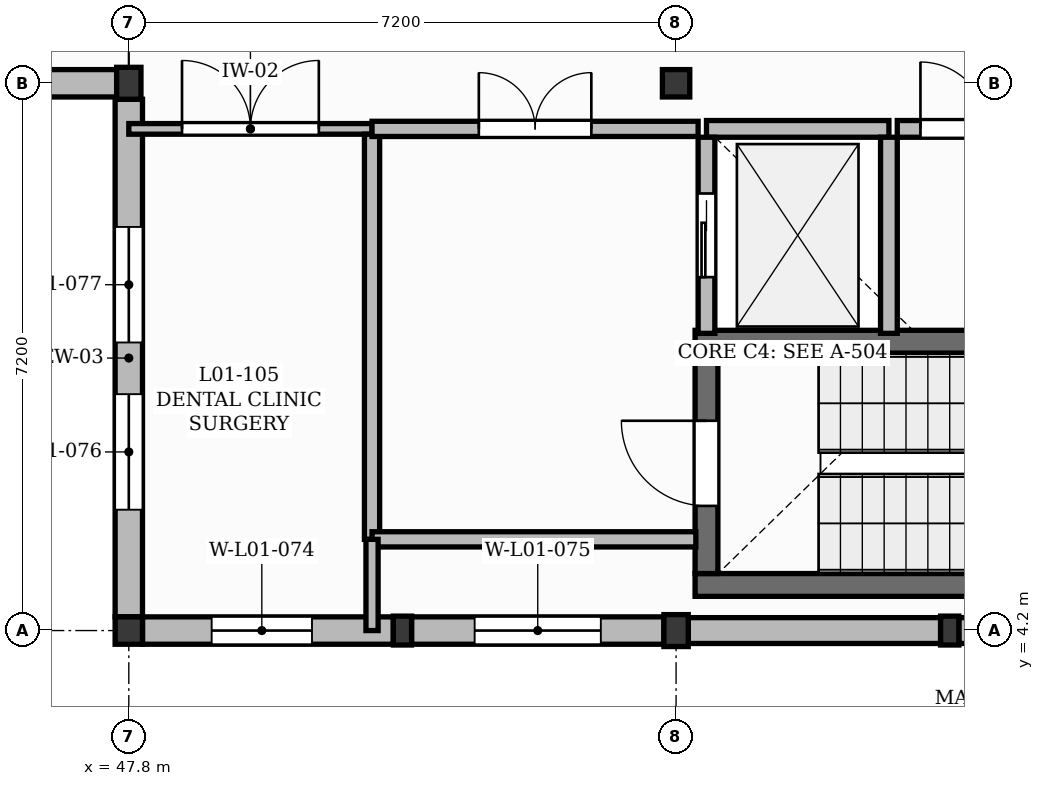
"""IFC4 building model, lengths in metres.
Left out: names, types, materials, properties, quantities, classifications, styles, units other than length and angle.
Written with IfcOpenShell. Run it as: python <this file> out.ifc"""

import sys

from ifc_helpers import new_model, si_unit, direction, frame, frame_2d, origin, origin_2d, place, context, subcontext, project, spatial, rectangle, extrude, element, fill, save


model = new_model("IFC4")
c1 = context("Model", 3, precision=1e-05, world=origin(), true_north=direction((0.0, 1.0)))
c2 = subcontext(c1, "Body", "Model", "MODEL_VIEW")
j1 = project(units=[si_unit("LENGTHUNIT", "METRE"), si_unit("PLANEANGLEUNIT", "RADIAN")], contexts=[c1])
p1 = place(None, origin())
s1 = spatial("IfcSite", under=j1, at=p1, CompositionType="ELEMENT")
p2 = place(p1, origin())
s2 = spatial("IfcBuilding", under=s1, at=p2, CompositionType="ELEMENT")
p3 = place(p2, frame((0.0, 0.0, 4.5)))
s3 = spatial("IfcBuildingStorey", under=s2, at=p3, CompositionType="ELEMENT", Elevation=4.5)
p4 = place(p3, frame((47.8, 4.2, 0.0), z_axis=(0.0, 0.0, 1.0), x_axis=(1.0, 0.0, 0.0)))
e1 = element("IfcColumn", 1, at=p4, inside=s3, PredefinedType="COLUMN", context=c2, shape_type="SweptSolid", body=[
    extrude(rectangle(XDim=0.36, YDim=0.36, at=origin_2d()), origin(), (0.0, 0.0, 1.0), 4.26),
])
for number, where, z_axis, x_axis in (
    (2, (47.8, 11.4, 0.0), (0.0, 0.0, 1.0), (1.0, 0.0, 0.0)),
    (3, (55.0, 4.2, 0.0), (0.0, 0.0, 1.0), (1.0, 0.0, 0.0)),
):
    element("IfcColumn", number, at=place(p3, frame(where, z_axis=z_axis, x_axis=x_axis)), inside=s3, PredefinedType="COLUMN", context=c2, shape_type="SweptSolid", body=[
        extrude(rectangle(XDim=0.32, YDim=0.42, at=origin_2d()), origin(), (0.0, 0.0, 1.0), 4.26),
    ])
p5 = place(p3, frame((55.0, 11.4, 0.0), z_axis=(0.0, 0.0, 1.0), x_axis=(1.0, 0.0, 0.0)))
e4 = element("IfcColumn", 4, at=p5, inside=s3, PredefinedType="COLUMN", context=c2, shape_type="SweptSolid", body=[
    extrude(rectangle(XDim=0.36, YDim=0.36, at=origin_2d()), origin(), (0.0, 0.0, 1.0), 4.26),
])
for number, where, z_axis, x_axis in (
    (5, (51.4, 4.2, 0.0), (0.0, 0.0, 1.0), (1.0, 0.0, 0.0)),
    (6, (58.6, 4.2, 0.0), (0.0, 0.0, 1.0), (1.0, 0.0, 0.0)),
):
    element("IfcColumn", number, at=place(p3, frame(where, z_axis=z_axis, x_axis=x_axis)), inside=s3, PredefinedType="PILASTER", context=c2, shape_type="SweptSolid", body=[
        extrude(rectangle(XDim=0.24, YDim=0.38, at=origin_2d()), origin(), (0.0, 0.0, 1.0), 4.26),
    ])
p6 = place(p3, frame((40.78, 11.4, 0.0), z_axis=(0.0, 0.0, 1.0), x_axis=(1.0, 0.0, 0.0)))
e7 = element("IfcWall", 7, at=p6, inside=s3, PredefinedType="SOLIDWALL", context=c2, shape_type="SweptSolid", body=[
    extrude(rectangle(XDim=6.86, YDim=0.36, at=frame_2d((3.43, 0.0))), origin(), (0.0, 0.0, 1.0), 3.8),
])
p7 = place(p6, frame((1.33, 0.0, 1.0)))
e8 = element("IfcOpeningElement", 8, at=p7, cuts=e7, PredefinedType="OPENING", context=c2, shape_type="SweptSolid", body=[
    extrude(rectangle(XDim=1.76, YDim=1.95, at=frame_2d((0.88, 0.975))), frame((0.0, 0.19, 0.0), z_axis=(0.0, -1.0, 0.0), x_axis=(1.0, 0.0, 0.0)), (0.0, 0.0, 1.0), 0.38),
])
p8 = place(p6, frame((3.77, 0.0, 1.0)))
e9 = element("IfcOpeningElement", 9, at=p8, cuts=e7, PredefinedType="OPENING", context=c2, shape_type="SweptSolid", body=[
    extrude(rectangle(XDim=1.76, YDim=1.95, at=frame_2d((0.88, 0.975))), frame((0.0, 0.19, 0.0), z_axis=(0.0, -1.0, 0.0), x_axis=(1.0, 0.0, 0.0)), (0.0, 0.0, 1.0), 0.38),
])
p9 = place(p3, frame((47.98, 4.2, 0.0), z_axis=(0.0, 0.0, 1.0), x_axis=(1.0, 0.0, 0.0)))
e10 = element("IfcWall", 10, at=p9, inside=s3, PredefinedType="SOLIDWALL", context=c2, shape_type="SweptSolid", body=[
    extrude(rectangle(XDim=3.3, YDim=0.36, at=frame_2d((1.65, 0.0))), origin(), (0.0, 0.0, 1.0), 3.8),
])
p10 = place(p9, frame((0.91, 0.0, 1.5)))
e11 = element("IfcOpeningElement", 11, at=p10, cuts=e10, PredefinedType="OPENING", context=c2, shape_type="SweptSolid", body=[
    extrude(rectangle(XDim=1.32, YDim=1.25, at=frame_2d((0.66, 0.625))), frame((0.0, 0.19, 0.0), z_axis=(0.0, -1.0, 0.0), x_axis=(1.0, 0.0, 0.0)), (0.0, 0.0, 1.0), 0.38),
])
p11 = place(p3, frame((51.52, 4.2, 0.0), z_axis=(0.0, 0.0, 1.0), x_axis=(1.0, 0.0, 0.0)))
e12 = element("IfcWall", 12, at=p11, inside=s3, PredefinedType="SOLIDWALL", context=c2, shape_type="SweptSolid", body=[
    extrude(rectangle(XDim=3.32, YDim=0.36, at=frame_2d((1.66, 0.0))), origin(), (0.0, 0.0, 1.0), 3.8),
])
p12 = place(p11, frame((0.83, 0.0, 1.0)))
e13 = element("IfcOpeningElement", 13, at=p12, cuts=e12, PredefinedType="OPENING", context=c2, shape_type="SweptSolid", body=[
    extrude(rectangle(XDim=1.66, YDim=1.8, at=frame_2d((0.83, 0.9))), frame((0.0, 0.19, 0.0), z_axis=(0.0, -1.0, 0.0), x_axis=(1.0, 0.0, 0.0)), (0.0, 0.0, 1.0), 0.38),
])
p13 = place(p3, frame((47.8, 4.38, 0.0), z_axis=(0.0, 0.0, 1.0), x_axis=(0.0, 1.0, 0.0)))
e14 = element("IfcWall", 14, at=p13, inside=s3, PredefinedType="SOLIDWALL", context=c2, shape_type="SweptSolid", body=[
    extrude(rectangle(XDim=6.81, YDim=0.36, at=frame_2d((3.405, 0.0))), origin(), (0.0, 0.0, 1.0), 3.8),
])
p14 = place(p13, frame((1.41, 0.0, 1.0)))
e15 = element("IfcOpeningElement", 15, at=p14, cuts=e14, PredefinedType="OPENING", context=c2, shape_type="SweptSolid", body=[
    extrude(rectangle(XDim=1.52, YDim=1.8, at=frame_2d((0.76, 0.9))), frame((0.0, 0.19, 0.0), z_axis=(0.0, -1.0, 0.0), x_axis=(1.0, 0.0, 0.0)), (0.0, 0.0, 1.0), 0.38),
])
p15 = place(p13, frame((3.61, 0.0, 1.0)))
e16 = element("IfcOpeningElement", 16, at=p15, cuts=e14, PredefinedType="OPENING", context=c2, shape_type="SweptSolid", body=[
    extrude(rectangle(XDim=1.52, YDim=1.8, at=frame_2d((0.76, 0.9))), frame((0.0, 0.19, 0.0), z_axis=(0.0, -1.0, 0.0), x_axis=(1.0, 0.0, 0.0)), (0.0, 0.0, 1.0), 0.38),
])
p16 = place(p3, frame((55.16, 4.2, 0.0), z_axis=(0.0, 0.0, 1.0), x_axis=(1.0, 0.0, 0.0)))
e17 = element("IfcWall", 17, at=p16, inside=s3, PredefinedType="SOLIDWALL", context=c2, shape_type="SweptSolid", body=[
    extrude(rectangle(XDim=3.32, YDim=0.34, at=frame_2d((1.66, 0.0))), origin(), (0.0, 0.0, 1.0), 3.8),
])
p17 = place(p3, frame((58.72, 4.2, 0.0), z_axis=(0.0, 0.0, 1.0), x_axis=(1.0, 0.0, 0.0)))
e18 = element("IfcWall", 18, at=p17, inside=s3, PredefinedType="SOLIDWALL", context=c2, shape_type="SweptSolid", body=[
    extrude(rectangle(XDim=3.3, YDim=0.34, at=frame_2d((1.65, 0.0))), origin(), (0.0, 0.0, 1.0), 3.8),
])
for number, where, z_axis, x_axis in (
    (19, (55.25, 4.8, 0.0), (0.0, 0.0, 1.0), (1.0, 0.0, 0.0)),
    (20, (55.25, 8.0, 0.0), (0.0, 0.0, 1.0), (1.0, 0.0, 0.0)),
):
    element("IfcWall", number, at=place(p3, frame(where, z_axis=z_axis, x_axis=x_axis)), inside=s3, PredefinedType="SHEAR", context=c2, shape_type="SweptSolid", body=[
        extrude(rectangle(XDim=6.7, YDim=0.3, at=frame_2d((3.35, 0.0))), origin(), (0.0, 0.0, 1.0), 4.25),
    ])
p18 = place(p3, frame((55.4, 4.95, 0.0), z_axis=(0.0, 0.0, 1.0), x_axis=(0.0, 1.0, 0.0)))
e21 = element("IfcWall", 21, at=p18, inside=s3, PredefinedType="SHEAR", context=c2, shape_type="SweptSolid", body=[
    extrude(rectangle(XDim=2.9, YDim=0.3, at=frame_2d((1.45, 0.0))), origin(), (0.0, 0.0, 1.0), 4.25),
])
p19 = place(p18, frame((0.89, 0.0, 0.0)))
e22 = element("IfcOpeningElement", 22, at=p19, cuts=e21, PredefinedType="OPENING", context=c2, shape_type="SweptSolid", body=[
    extrude(rectangle(XDim=1.12, YDim=2.1, at=frame_2d((0.56, 1.05))), frame((0.0, 0.16, 0.0), z_axis=(0.0, -1.0, 0.0), x_axis=(1.0, 0.0, 0.0)), (0.0, 0.0, 1.0), 0.32),
])
p20 = place(p3, frame((55.4, 10.8, 0.0), z_axis=(0.0, 0.0, 1.0), x_axis=(1.0, 0.0, 0.0)))
e23 = element("IfcWall", 23, at=p20, inside=s3, PredefinedType="SOLIDWALL", context=c2, shape_type="SweptSolid", body=[
    extrude(rectangle(XDim=2.4, YDim=0.22, at=frame_2d((1.2, 0.0))), origin(), (0.0, 0.0, 1.0), 4.25),
])
p21 = place(p3, frame((55.4, 8.11, 0.0), z_axis=(0.0, 0.0, 1.0), x_axis=(0.0, 1.0, 0.0)))
e24 = element("IfcWall", 24, at=p21, inside=s3, PredefinedType="SOLIDWALL", context=c2, shape_type="SweptSolid", body=[
    extrude(rectangle(XDim=2.58, YDim=0.22, at=frame_2d((1.29, 0.0))), origin(), (0.0, 0.0, 1.0), 4.25),
])
p22 = place(p21, frame((0.74, 0.0, 0.0)))
e25 = element("IfcOpeningElement", 25, at=p22, cuts=e24, PredefinedType="OPENING", context=c2, shape_type="SweptSolid", body=[
    extrude(rectangle(XDim=1.1, YDim=2.15, at=frame_2d((0.55, 1.075))), frame((0.0, 0.12, 0.0), z_axis=(0.0, -1.0, 0.0), x_axis=(1.0, 0.0, 0.0)), (0.0, 0.0, 1.0), 0.24),
])
p23 = place(p3, frame((57.8, 8.11, 0.0), z_axis=(0.0, 0.0, 1.0), x_axis=(0.0, 1.0, 0.0)))
e26 = element("IfcWall", 26, at=p23, inside=s3, PredefinedType="SOLIDWALL", context=c2, shape_type="SweptSolid", body=[
    extrude(rectangle(XDim=2.58, YDim=0.22, at=frame_2d((1.29, 0.0))), origin(), (0.0, 0.0, 1.0), 4.25),
])
p24 = place(p3, frame((47.8, 10.8, 0.0), z_axis=(0.0, 0.0, 1.0), x_axis=(1.0, 0.0, 0.0)))
e27 = element("IfcWall", 27, at=p24, inside=s3, PredefinedType="PARTITIONING", context=c2, shape_type="SweptSolid", body=[
    extrude(rectangle(XDim=3.2, YDim=0.14, at=frame_2d((1.6, 0.0))), origin(), (0.0, 0.0, 1.0), 4.18),
])
p25 = place(p24, frame((0.7, 0.0, 0.0)))
e28 = element("IfcOpeningElement", 28, at=p25, cuts=e27, PredefinedType="OPENING", context=c2, shape_type="SweptSolid", body=[
    extrude(rectangle(XDim=1.8, YDim=2.3, at=frame_2d((0.9, 1.15))), frame((0.0, 0.08, 0.0), z_axis=(0.0, -1.0, 0.0), x_axis=(1.0, 0.0, 0.0)), (0.0, 0.0, 1.0), 0.16),
])
p26 = place(p3, frame((51.0, 5.4, 0.0), z_axis=(0.0, 0.0, 1.0), x_axis=(0.0, 1.0, 0.0)))
e29 = element("IfcWall", 29, at=p26, inside=s3, PredefinedType="PARTITIONING", context=c2, shape_type="SweptSolid", body=[
    extrude(rectangle(XDim=5.33, YDim=0.2, at=frame_2d((2.665, 0.0))), origin(), (0.0, 0.0, 1.0), 4.18),
])
p27 = place(p3, frame((51.0, 10.8, 0.0), z_axis=(0.0, 0.0, 1.0), x_axis=(1.0, 0.0, 0.0)))
e30 = element("IfcWall", 30, at=p27, inside=s3, PredefinedType="PARTITIONING", context=c2, shape_type="SweptSolid", body=[
    extrude(rectangle(XDim=4.29, YDim=0.2, at=frame_2d((2.145, 0.0))), origin(), (0.0, 0.0, 1.0), 4.18),
])
p28 = place(p27, frame((1.405, 0.0, 0.0)))
e31 = element("IfcOpeningElement", 31, at=p28, cuts=e30, PredefinedType="OPENING", context=c2, shape_type="SweptSolid", body=[
    extrude(rectangle(XDim=1.48, YDim=2.25, at=frame_2d((0.74, 1.125))), frame((0.0, 0.11, 0.0), z_axis=(0.0, -1.0, 0.0), x_axis=(1.0, 0.0, 0.0)), (0.0, 0.0, 1.0), 0.22),
])
p29 = place(p3, frame((57.91, 10.8, 0.0), z_axis=(0.0, 0.0, 1.0), x_axis=(1.0, 0.0, 0.0)))
e32 = element("IfcWall", 32, at=p29, inside=s3, PredefinedType="SOLIDWALL", context=c2, shape_type="SweptSolid", body=[
    extrude(rectangle(XDim=1.49, YDim=0.22, at=frame_2d((0.745, 0.0))), origin(), (0.0, 0.0, 1.0), 4.18),
])
p30 = place(p29, frame((0.305, 0.0, 0.0)))
e33 = element("IfcOpeningElement", 33, at=p30, cuts=e32, PredefinedType="OPENING", context=c2, shape_type="SweptSolid", body=[
    extrude(rectangle(XDim=0.88, YDim=2.05, at=frame_2d((0.44, 1.025))), frame((0.0, 0.12, 0.0), z_axis=(0.0, -1.0, 0.0), x_axis=(1.0, 0.0, 0.0)), (0.0, 0.0, 1.0), 0.24),
])
p31 = place(p3, frame((51.0, 5.4, 0.0), z_axis=(0.0, 0.0, 1.0), x_axis=(1.0, 0.0, 0.0)))
e34 = element("IfcWall", 34, at=p31, inside=s3, PredefinedType="PARTITIONING", context=c2, shape_type="SweptSolid", body=[
    extrude(rectangle(XDim=4.26, YDim=0.2, at=frame_2d((2.13, 0.0))), origin(), (0.0, 0.0, 1.0), 4.18),
])
p32 = place(p3, frame((51.0, 4.2, 0.0), z_axis=(0.0, 0.0, 1.0), x_axis=(0.0, 1.0, 0.0)))
e35 = element("IfcWall", 35, at=p32, inside=s3, PredefinedType="PARTITIONING", context=c2, shape_type="SweptSolid", body=[
    extrude(rectangle(XDim=1.2, YDim=0.16, at=frame_2d((0.6, 0.0))), origin(), (0.0, 0.0, 1.0), 4.18),
])
p33 = place(p10, origin())
e36 = element("IfcWindow", 36, at=p33, inside=s3, PartitioningType="SINGLE_PANEL", PredefinedType="WINDOW", context=c2, shape_type="SweptSolid", body=[
    extrude(rectangle(XDim=1.32, YDim=1.25, at=frame_2d((0.66, 0.625))), frame((0.0, 0.03, 0.0), z_axis=(0.0, -1.0, 0.0), x_axis=(1.0, 0.0, 0.0)), (0.0, 0.0, 1.0), 0.06),
])
fill(e11, e36)
p34 = place(p12, origin())
e37 = element("IfcWindow", 37, at=p34, inside=s3, PartitioningType="DOUBLE_PANEL_VERTICAL", PredefinedType="WINDOW", context=c2, shape_type="SweptSolid", body=[
    extrude(rectangle(XDim=1.66, YDim=1.8, at=frame_2d((0.83, 0.9))), frame((0.0, 0.03, 0.0), z_axis=(0.0, -1.0, 0.0), x_axis=(1.0, 0.0, 0.0)), (0.0, 0.0, 1.0), 0.06),
])
fill(e13, e37)
p35 = place(p14, origin())
e38 = element("IfcWindow", 38, at=p35, inside=s3, PartitioningType="DOUBLE_PANEL_VERTICAL", PredefinedType="WINDOW", context=c2, shape_type="SweptSolid", body=[
    extrude(rectangle(XDim=1.52, YDim=1.8, at=frame_2d((0.76, 0.9))), frame((0.0, 0.03, 0.0), z_axis=(0.0, -1.0, 0.0), x_axis=(1.0, 0.0, 0.0)), (0.0, 0.0, 1.0), 0.06),
])
fill(e15, e38)
p36 = place(p15, origin())
e39 = element("IfcWindow", 39, at=p36, inside=s3, PartitioningType="DOUBLE_PANEL_VERTICAL", PredefinedType="WINDOW", context=c2, shape_type="SweptSolid", body=[
    extrude(rectangle(XDim=1.52, YDim=1.8, at=frame_2d((0.76, 0.9))), frame((0.0, 0.03, 0.0), z_axis=(0.0, -1.0, 0.0), x_axis=(1.0, 0.0, 0.0)), (0.0, 0.0, 1.0), 0.06),
])
fill(e16, e39)
p37 = place(p22, origin())
e40 = element("IfcDoor", 40, at=p37, inside=s3, OperationType="SLIDING_TO_LEFT", PredefinedType="DOOR", context=c2, shape_type="SweptSolid", body=[
    extrude(rectangle(XDim=1.1, YDim=2.15, at=frame_2d((0.55, 1.075))), frame((0.0, 0.025, 0.0), z_axis=(0.0, -1.0, 0.0), x_axis=(1.0, 0.0, 0.0)), (0.0, 0.0, 1.0), 0.05),
])
fill(e25, e40)
p38 = place(p19, origin())
e41 = element("IfcDoor", 41, at=p38, inside=s3, OperationType="SINGLE_SWING_RIGHT", PredefinedType="DOOR", context=c2, shape_type="SweptSolid", body=[
    extrude(rectangle(XDim=1.12, YDim=2.1, at=frame_2d((0.56, 1.05))), frame((0.0, 0.025, 0.0), z_axis=(0.0, -1.0, 0.0), x_axis=(1.0, 0.0, 0.0)), (0.0, 0.0, 1.0), 0.05),
])
fill(e22, e41)
p39 = place(p28, origin())
e42 = element("IfcDoor", 42, at=p39, inside=s3, OperationType="DOUBLE_DOOR_SINGLE_SWING", PredefinedType="DOOR", context=c2, shape_type="SweptSolid", body=[
    extrude(rectangle(XDim=1.48, YDim=2.25, at=frame_2d((0.74, 1.125))), frame((0.0, 0.025, 0.0), z_axis=(0.0, -1.0, 0.0), x_axis=(1.0, 0.0, 0.0)), (0.0, 0.0, 1.0), 0.05),
])
fill(e31, e42)
p40 = place(p30, origin())
e43 = element("IfcDoor", 43, at=p40, inside=s3, OperationType="SINGLE_SWING_LEFT", PredefinedType="DOOR", context=c2, shape_type="SweptSolid", body=[
    extrude(rectangle(XDim=0.88, YDim=2.05, at=frame_2d((0.44, 1.025))), frame((0.0, 0.025, 0.0), z_axis=(0.0, -1.0, 0.0), x_axis=(1.0, 0.0, 0.0)), (0.0, 0.0, 1.0), 0.05),
])
fill(e33, e43)
p41 = place(p25, origin())
e44 = element("IfcDoor", 44, at=p41, inside=s3, OperationType="DOUBLE_DOOR_SINGLE_SWING", PredefinedType="DOOR", context=c2, shape_type="SweptSolid", body=[
    extrude(rectangle(XDim=1.8, YDim=2.3, at=frame_2d((0.9, 1.15))), frame((0.0, 0.025, 0.0), z_axis=(0.0, -1.0, 0.0), x_axis=(1.0, 0.0, 0.0)), (0.0, 0.0, 1.0), 0.05),
])
fill(e28, e44)
save(model, sys.argv[1])
